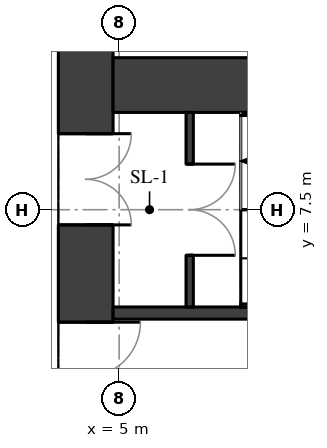
"""IFC4 building model, lengths in metres.
Left out: names, types, materials, properties, quantities, classifications, styles, units other than length and angle.
Written with IfcOpenShell. Run it as: python <this file> out.ifc"""

import sys

from ifc_helpers import new_model, si_unit, direction, frame, frame_2d, origin, place, context, subcontext, project, spatial, rectangle, extrude, element, fill, save


model = new_model("IFC4")
c1 = context("Model", 3, precision=1e-05, world=origin(), true_north=direction((0.0, 1.0)))
c2 = subcontext(c1, "Body", "Model", "MODEL_VIEW")
j1 = project(units=[si_unit("LENGTHUNIT", "METRE"), si_unit("PLANEANGLEUNIT", "RADIAN")], contexts=[c1])
p1 = place(None, origin())
s1 = spatial("IfcSite", under=j1, at=p1, CompositionType="ELEMENT")
p2 = place(p1, origin())
s2 = spatial("IfcBuilding", under=s1, at=p2, CompositionType="ELEMENT")
p3 = place(p2, frame((0.0, 0.0, 92.2)))
s3 = spatial("IfcBuildingStorey", under=s2, at=p3, CompositionType="ELEMENT", Elevation=92.2)
p4 = place(p3, frame((4.45, -11.1, 0.0), z_axis=(0.0, 0.0, 1.0), x_axis=(0.0, 1.0, 0.0)))
e1 = element("IfcWall", 1, at=p4, inside=s3, PredefinedType="SHEAR", context=c2, shape_type="SweptSolid", body=[
    extrude(rectangle(XDim=22.2, YDim=0.9, at=frame_2d((11.1, 0.0))), origin(), (0.0, 0.0, 1.0), 3.02),
])
p5 = place(p4, frame((2.35, 0.0, 0.0)))
e2 = element("IfcOpeningElement", 2, at=p5, cuts=e1, PredefinedType="OPENING", context=c2, shape_type="SweptSolid", body=[
    extrude(rectangle(XDim=1.5, YDim=2.1, at=frame_2d((0.75, 1.05))), frame((0.0, 0.46, 0.0), z_axis=(0.0, -1.0, 0.0), x_axis=(1.0, 0.0, 0.0)), (0.0, 0.0, 1.0), 0.92),
])
p6 = place(p4, frame((5.45, 0.0, 0.0)))
e3 = element("IfcOpeningElement", 3, at=p6, cuts=e1, PredefinedType="OPENING", context=c2, shape_type="SweptSolid", body=[
    extrude(rectangle(XDim=1.8, YDim=2.1, at=frame_2d((0.9, 1.05))), frame((0.0, 0.46, 0.0), z_axis=(0.0, -1.0, 0.0), x_axis=(1.0, 0.0, 0.0)), (0.0, 0.0, 1.0), 0.92),
])
p7 = place(p4, frame((7.95, 0.0, 0.0)))
e4 = element("IfcOpeningElement", 4, at=p7, cuts=e1, PredefinedType="OPENING", context=c2, shape_type="SweptSolid", body=[
    extrude(rectangle(XDim=1.1, YDim=2.1, at=frame_2d((0.55, 1.05))), frame((0.0, 0.46, 0.0), z_axis=(0.0, -1.0, 0.0), x_axis=(1.0, 0.0, 0.0)), (0.0, 0.0, 1.0), 0.92),
])
p8 = place(p4, frame((10.6, 0.0, 0.0)))
e5 = element("IfcOpeningElement", 5, at=p8, cuts=e1, PredefinedType="OPENING", context=c2, shape_type="SweptSolid", body=[
    extrude(rectangle(XDim=1.0, YDim=2.1, at=frame_2d((0.5, 1.05))), frame((0.0, 0.46, 0.0), z_axis=(0.0, -1.0, 0.0), x_axis=(1.0, 0.0, 0.0)), (0.0, 0.0, 1.0), 0.92),
])
p9 = place(p4, frame((13.15, 0.0, 0.0)))
e6 = element("IfcOpeningElement", 6, at=p9, cuts=e1, PredefinedType="OPENING", context=c2, shape_type="SweptSolid", body=[
    extrude(rectangle(XDim=1.1, YDim=2.1, at=frame_2d((0.55, 1.05))), frame((0.0, 0.46, 0.0), z_axis=(0.0, -1.0, 0.0), x_axis=(1.0, 0.0, 0.0)), (0.0, 0.0, 1.0), 0.92),
])
p10 = place(p4, frame((14.95, 0.0, 0.0)))
e7 = element("IfcOpeningElement", 7, at=p10, cuts=e1, PredefinedType="OPENING", context=c2, shape_type="SweptSolid", body=[
    extrude(rectangle(XDim=1.8, YDim=2.1, at=frame_2d((0.9, 1.05))), frame((0.0, 0.46, 0.0), z_axis=(0.0, -1.0, 0.0), x_axis=(1.0, 0.0, 0.0)), (0.0, 0.0, 1.0), 0.92),
])
p11 = place(p4, frame((18.35, 0.0, 0.0)))
e8 = element("IfcOpeningElement", 8, at=p11, cuts=e1, PredefinedType="OPENING", context=c2, shape_type="SweptSolid", body=[
    extrude(rectangle(XDim=1.5, YDim=2.1, at=frame_2d((0.75, 1.05))), frame((0.0, 0.46, 0.0), z_axis=(0.0, -1.0, 0.0), x_axis=(1.0, 0.0, 0.0)), (0.0, 0.0, 1.0), 0.92),
])
p12 = place(p3, frame((4.9, 9.55, 0.0), z_axis=(0.0, 0.0, 1.0), x_axis=(1.0, 0.0, 0.0)))
e9 = element("IfcWall", 9, at=p12, inside=s3, PredefinedType="SHEAR", context=c2, shape_type="SweptSolid", body=[
    extrude(rectangle(XDim=10.2, YDim=0.9, at=frame_2d((5.1, 0.0))), origin(), (0.0, 0.0, 1.0), 3.02),
])
p13 = place(p3, frame((4.9, 5.8, 0.0), z_axis=(0.0, 0.0, 1.0), x_axis=(1.0, 0.0, 0.0)))
e10 = element("IfcWall", 10, at=p13, inside=s3, PredefinedType="SHEAR", context=c2, shape_type="SweptSolid", body=[
    extrude(rectangle(XDim=10.2, YDim=0.2, at=frame_2d((5.1, 0.0))), origin(), (0.0, 0.0, 1.0), 3.02),
])
p14 = place(p13, frame((6.75, 0.0, 0.0)))
e11 = element("IfcOpeningElement", 11, at=p14, cuts=e10, PredefinedType="OPENING", context=c2, shape_type="SweptSolid", body=[
    extrude(rectangle(XDim=1.1, YDim=2.1, at=frame_2d((0.55, 1.05))), frame((0.0, 0.11, 0.0), z_axis=(0.0, -1.0, 0.0), x_axis=(1.0, 0.0, 0.0)), (0.0, 0.0, 1.0), 0.22),
])
p15 = place(p13, frame((8.75, 0.0, 0.0)))
e12 = element("IfcOpeningElement", 12, at=p15, cuts=e10, PredefinedType="OPENING", context=c2, shape_type="SweptSolid", body=[
    extrude(rectangle(XDim=1.1, YDim=2.1, at=frame_2d((0.55, 1.05))), frame((0.0, 0.11, 0.0), z_axis=(0.0, -1.0, 0.0), x_axis=(1.0, 0.0, 0.0)), (0.0, 0.0, 1.0), 0.22),
])
p16 = place(p3, frame((6.16, 5.9, 0.0), z_axis=(0.0, 0.0, 1.0), x_axis=(0.0, 1.0, 0.0)))
e13 = element("IfcWall", 13, at=p16, inside=s3, PredefinedType="SHEAR", context=c2, shape_type="SweptSolid", body=[
    extrude(rectangle(XDim=3.2, YDim=0.12, at=frame_2d((1.6, 0.0))), origin(), (0.0, 0.0, 1.0), 3.02),
])
p17 = place(p16, frame((0.85, 0.0, 0.0)))
e14 = element("IfcOpeningElement", 14, at=p17, cuts=e13, PredefinedType="OPENING", context=c2, shape_type="SweptSolid", body=[
    extrude(rectangle(XDim=1.5, YDim=2.1, at=frame_2d((0.75, 1.05))), frame((0.0, 0.07, 0.0), z_axis=(0.0, -1.0, 0.0), x_axis=(1.0, 0.0, 0.0)), (0.0, 0.0, 1.0), 0.14),
])
p18 = place(p10, origin())
e15 = element("IfcDoor", 15, at=p18, inside=s3, OperationType="DOUBLE_DOOR_SINGLE_SWING", PredefinedType="DOOR", context=c2, shape_type="SweptSolid", body=[
    extrude(rectangle(XDim=1.8, YDim=2.1, at=frame_2d((0.9, 1.05))), frame((0.0, 0.025, 0.0), z_axis=(0.0, -1.0, 0.0), x_axis=(1.0, 0.0, 0.0)), (0.0, 0.0, 1.0), 0.05),
])
fill(e7, e15)
p19 = place(p11, origin())
e16 = element("IfcDoor", 16, at=p19, inside=s3, OperationType="DOUBLE_DOOR_SINGLE_SWING", PredefinedType="DOOR", context=c2, shape_type="SweptSolid", body=[
    extrude(rectangle(XDim=1.5, YDim=2.1, at=frame_2d((0.75, 1.05))), frame((0.0, 0.025, 0.0), z_axis=(0.0, -1.0, 0.0), x_axis=(1.0, 0.0, 0.0)), (0.0, 0.0, 1.0), 0.05),
])
fill(e8, e16)
p20 = place(p17, origin())
e17 = element("IfcDoor", 17, at=p20, inside=s3, OperationType="DOUBLE_DOOR_SINGLE_SWING", PredefinedType="DOOR", context=c2, shape_type="SweptSolid", body=[
    extrude(rectangle(XDim=1.5, YDim=2.1, at=frame_2d((0.75, 1.05))), frame((0.0, 0.025, 0.0), z_axis=(0.0, -1.0, 0.0), x_axis=(1.0, 0.0, 0.0)), (0.0, 0.0, 1.0), 0.05),
])
fill(e14, e17)
save(model, sys.argv[1])
